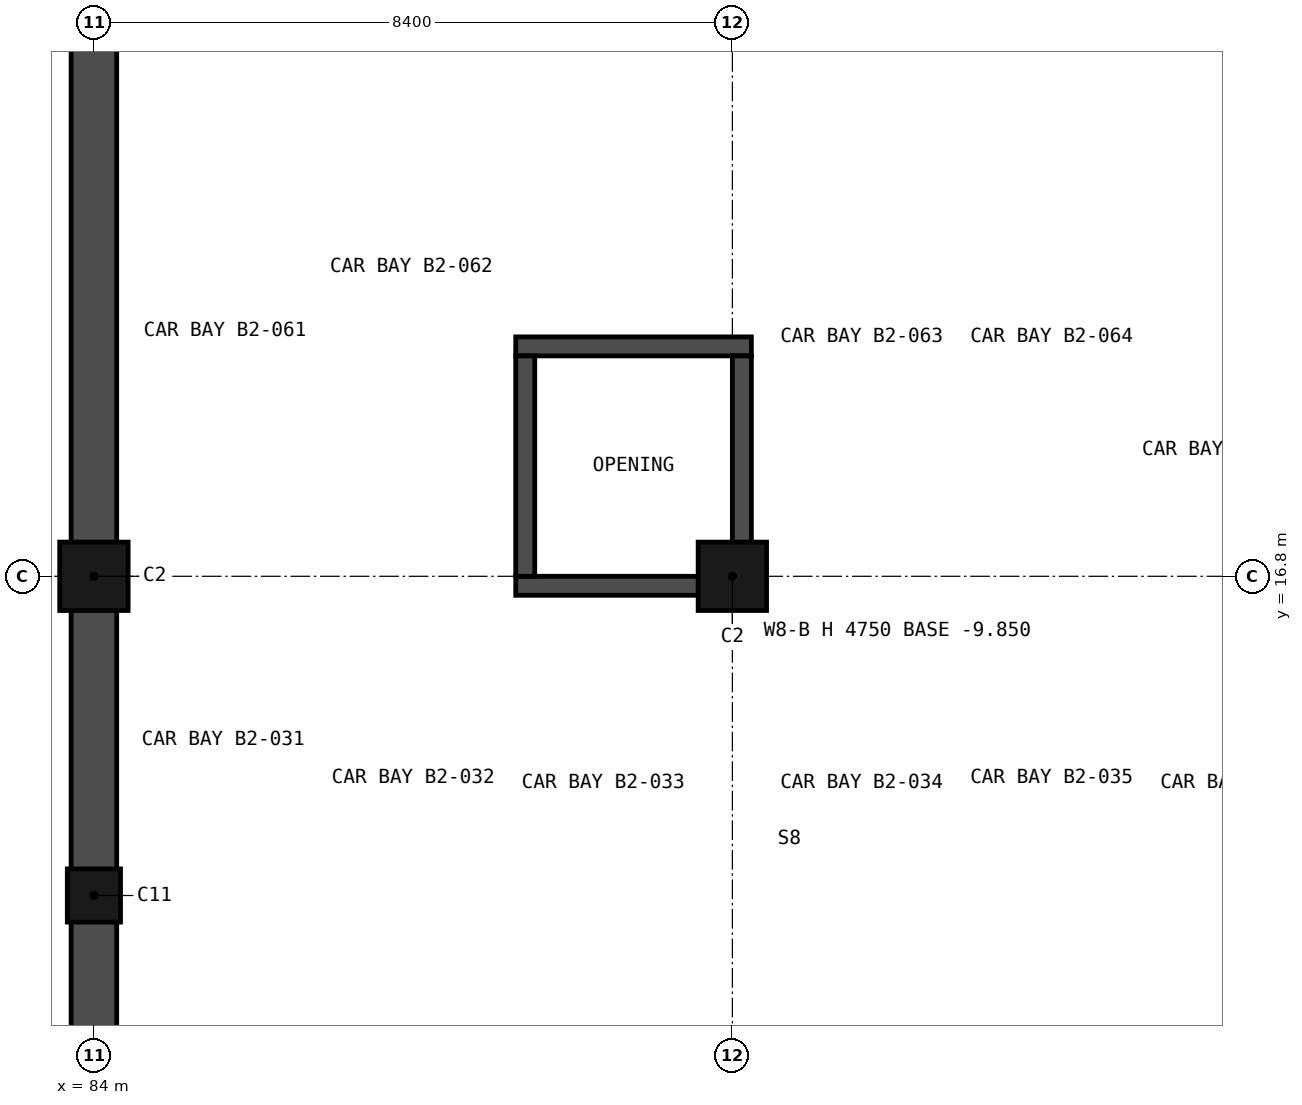
"""IFC4 building model, lengths in metres.
Left out: names, types, materials, properties, quantities, classifications, styles, units other than length and angle.
Written with IfcOpenShell. Run it as: python <this file> out.ifc"""

import sys

from ifc_helpers import new_model, si_unit, direction, frame, frame_2d, origin, origin_2d, place, context, subcontext, project, spatial, rectangle, circle, extrude, element, save


model = new_model("IFC4")
c1 = context("Model", 3, precision=1e-05, world=origin(), true_north=direction((0.0, 1.0)))
c2 = subcontext(c1, "Body", "Model", "MODEL_VIEW")
j1 = project(units=[si_unit("LENGTHUNIT", "METRE"), si_unit("PLANEANGLEUNIT", "RADIAN")], contexts=[c1])
p1 = place(None, origin())
s1 = spatial("IfcSite", under=j1, at=p1, CompositionType="ELEMENT")
p2 = place(p1, origin())
s2 = spatial("IfcBuilding", under=s1, at=p2, CompositionType="ELEMENT")
p3 = place(p2, frame((0.0, 0.0, -9.6)))
s3 = spatial("IfcBuildingStorey", under=s2, at=p3, CompositionType="ELEMENT", Elevation=-9.6)
for number, where, z_axis, x_axis in (
    (1, (84.0, 16.8, -0.25), (0.0, 0.0, 1.0), (1.0, 0.0, 0.0)),
    (2, (92.4, 16.8, -0.25), (0.0, 0.0, 1.0), (1.0, 0.0, 0.0)),
):
    element("IfcColumn", number, at=place(p3, frame(where, z_axis=z_axis, x_axis=x_axis)), inside=s3, PredefinedType="COLUMN", context=c2, shape_type="SweptSolid", body=[
        extrude(rectangle(XDim=0.9, YDim=0.9, at=origin_2d()), origin(), (0.0, 0.0, 1.0), 4.75),
    ])
p4 = place(p3, frame((84.0, 12.6, -0.25), z_axis=(0.0, 0.0, 1.0), x_axis=(1.0, 0.0, 0.0)))
e3 = element("IfcColumn", 3, at=p4, inside=s3, PredefinedType="COLUMN", context=c2, shape_type="SweptSolid", body=[
    extrude(circle(Radius=0.35, at=origin_2d()), origin(), (0.0, 0.0, 1.0), 4.75),
])
for number, where, z_axis, x_axis in (
    (4, (89.55, 16.675, -0.25), (0.0, 0.0, 1.0), (1.0, 0.0, 0.0)),
    (5, (89.55, 19.825, -0.25), (0.0, 0.0, 1.0), (1.0, 0.0, 0.0)),
):
    element("IfcWall", number, at=place(p3, frame(where, z_axis=z_axis, x_axis=x_axis)), inside=s3, PredefinedType="SHEAR", context=c2, shape_type="SweptSolid", body=[
        extrude(rectangle(XDim=3.1, YDim=0.25, at=frame_2d((1.55, 0.0))), origin(), (0.0, 0.0, 1.0), 4.75),
    ])
for number, where, z_axis, x_axis in (
    (6, (89.675, 16.8, -0.25), (0.0, 0.0, 1.0), (0.0, 1.0, 0.0)),
    (7, (92.525, 16.8, -0.25), (0.0, 0.0, 1.0), (0.0, 1.0, 0.0)),
):
    element("IfcWall", number, at=place(p3, frame(where, z_axis=z_axis, x_axis=x_axis)), inside=s3, PredefinedType="SHEAR", context=c2, shape_type="SweptSolid", body=[
        extrude(rectangle(XDim=2.9, YDim=0.25, at=frame_2d((1.45, 0.0))), origin(), (0.0, 0.0, 1.0), 4.75),
    ])
p5 = place(p3, frame((84.0, 50.7, -0.25), z_axis=(0.0, 0.0, 1.0), x_axis=(0.0, -1.0, 0.0)))
e8 = element("IfcWall", 8, at=p5, inside=s3, PredefinedType="SOLIDWALL", context=c2, shape_type="SweptSolid", body=[
    extrude(rectangle(XDim=51.0, YDim=0.6, at=frame_2d((25.5, 0.0))), origin(), (0.0, 0.0, 1.0), 4.75),
])
save(model, sys.argv[1])
